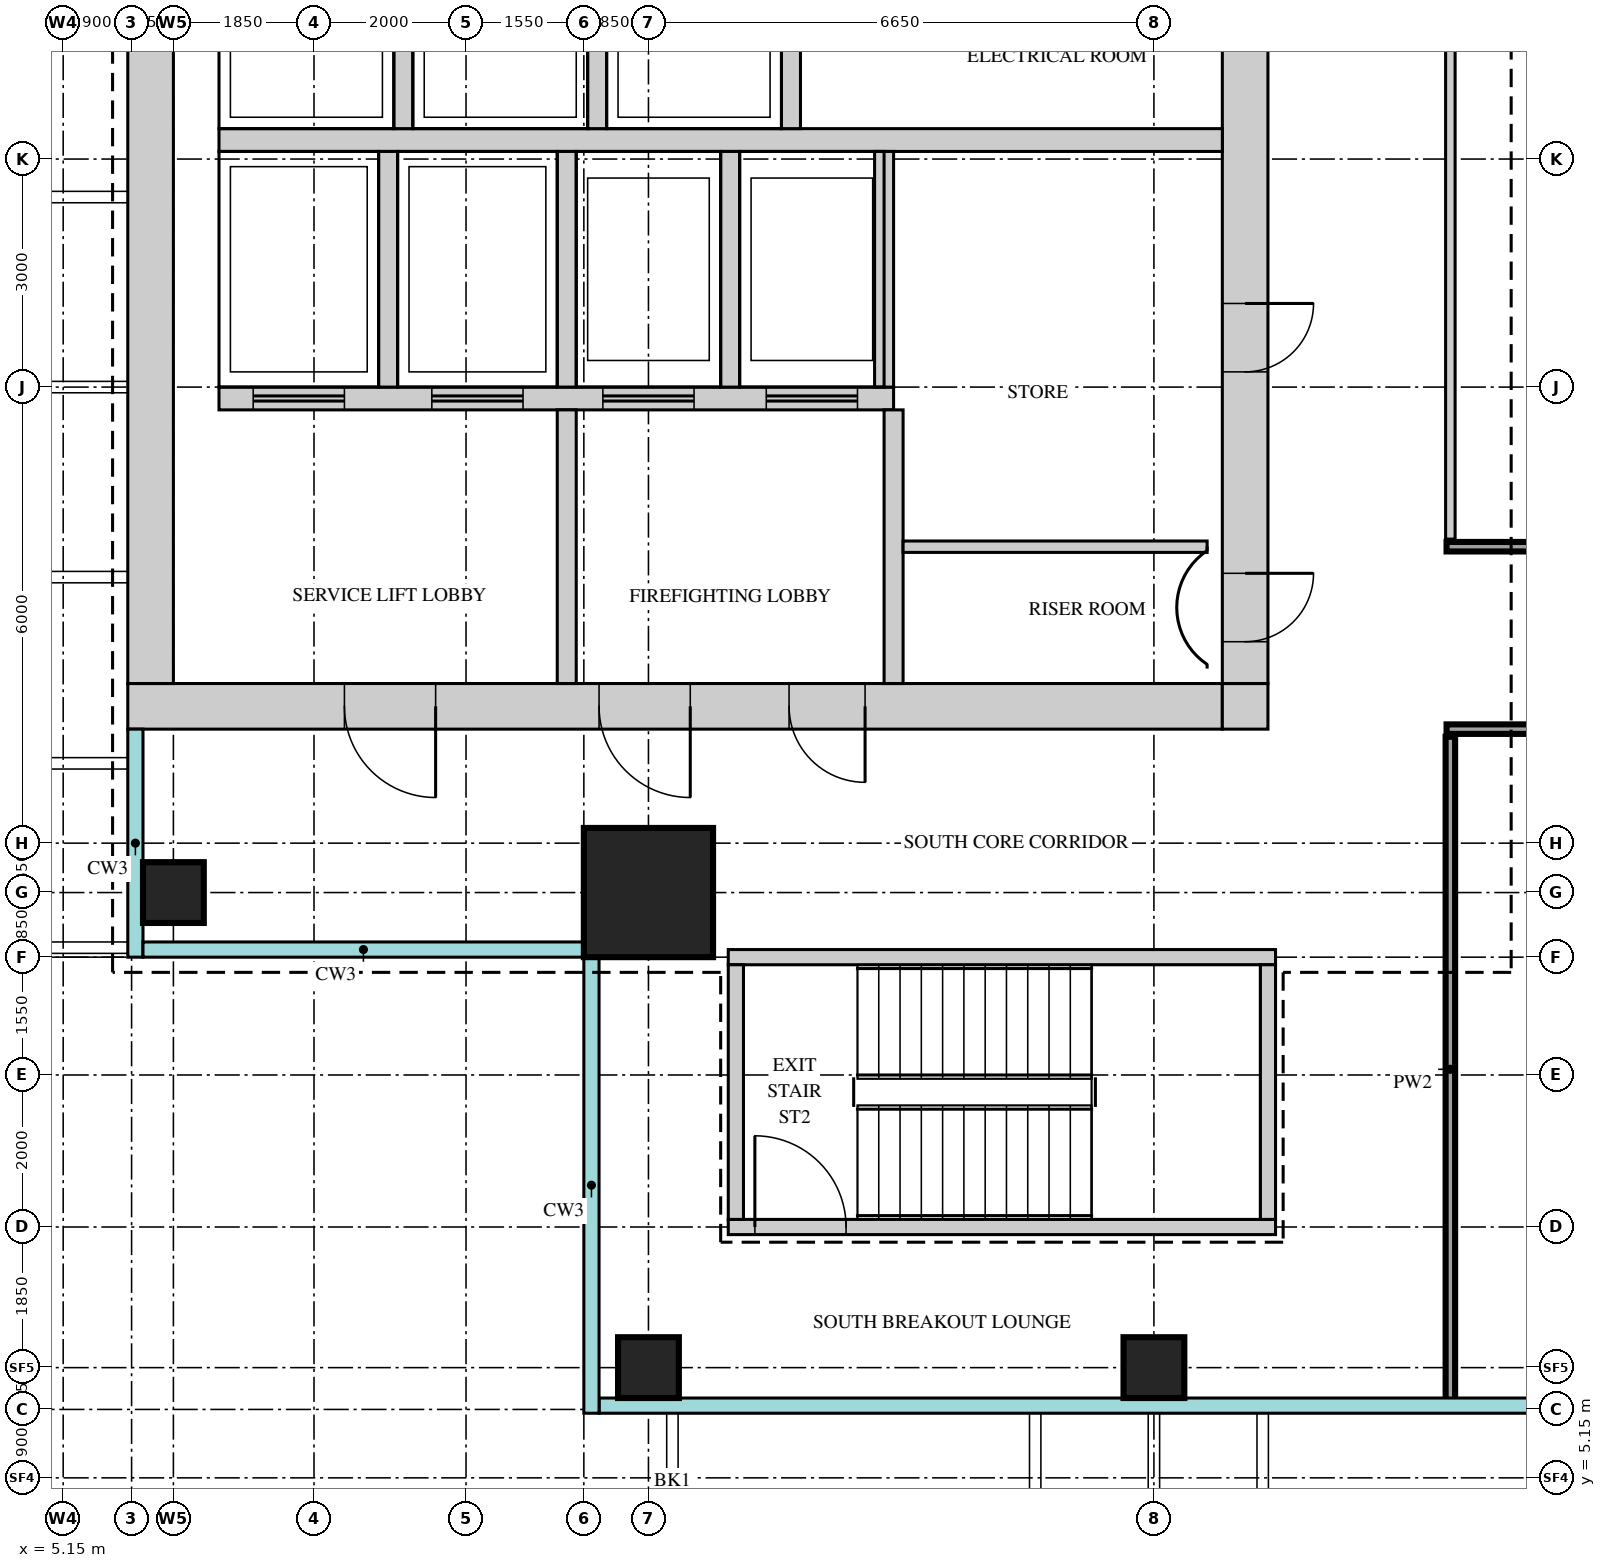
"""IFC4 building model, lengths in metres.
Left out: names, types, materials, properties, quantities, classifications, styles, units other than length and angle.
Written with IfcOpenShell. Run it as: python <this file> out.ifc"""

import sys

from ifc_helpers import new_model, si_unit, direction, frame, frame_2d, origin, origin_2d, place, context, subcontext, project, spatial, rectangle, extrude, source, transform, mapped, element, fill, save


model = new_model("IFC4")
c1 = context("Model", 3, precision=1e-05, world=origin(), true_north=direction((0.0, 1.0)))
c2 = subcontext(c1, "Body", "Model", "MODEL_VIEW")
j1 = project(units=[si_unit("LENGTHUNIT", "METRE"), si_unit("PLANEANGLEUNIT", "RADIAN")], contexts=[c1])
p1 = place(None, origin())
s1 = spatial("IfcSite", under=j1, at=p1, CompositionType="ELEMENT")
p2 = place(p1, origin())
s2 = spatial("IfcBuilding", under=s1, at=p2, CompositionType="ELEMENT")
p3 = place(p2, frame((0.0, 0.0, 318.2)))
s3 = spatial("IfcBuildingStorey", under=s2, at=p3, CompositionType="ELEMENT", Elevation=318.2)
m1 = source(origin(), c2, "Body", "SweptSolid", [
    extrude(rectangle(XDim=14.4, YDim=0.6, at=frame_2d((7.2, 0.0))), origin(), (0.0, 0.0, 1.0), 3.75),
])
p4 = place(p3, frame((6.0, 15.3, 0.0), z_axis=(0.0, 0.0, 1.0), x_axis=(1.0, 0.0, 0.0)))
e1 = element("IfcWall", 1, at=p4, inside=s3, PredefinedType="SHEAR", context=c2, shape_type="MappedRepresentation", body=[
    mapped(m1, transform((0.0, 0.0, 0.0))),
])
m2 = source(origin(), c2, "Body", "SweptSolid", [
    extrude(rectangle(XDim=1.2, YDim=2.1, at=frame_2d((0.6, 1.05))), frame((0.0, 0.31, 0.0), z_axis=(0.0, -1.0, 0.0), x_axis=(1.0, 0.0, 0.0)), (0.0, 0.0, 1.0), 0.62),
])
p5 = place(p4, frame((6.2, 0.0, 0.0)))
e2 = element("IfcOpeningElement", 2, at=p5, cuts=e1, PredefinedType="OPENING", context=c2, shape_type="MappedRepresentation", body=[
    mapped(m2, transform((0.0, 0.0, 0.0))),
])
p6 = place(p4, frame((2.85, 0.0, 0.0)))
e3 = element("IfcOpeningElement", 3, at=p6, cuts=e1, PredefinedType="OPENING", context=c2, shape_type="MappedRepresentation", body=[
    mapped(m2, transform((0.0, 0.0, 0.0))),
])
m3 = source(origin(), c2, "Body", "SweptSolid", [
    extrude(rectangle(XDim=1.0, YDim=2.1, at=frame_2d((0.5, 1.05))), frame((0.0, 0.31, 0.0), z_axis=(0.0, -1.0, 0.0), x_axis=(1.0, 0.0, 0.0)), (0.0, 0.0, 1.0), 0.62),
])
p7 = place(p4, frame((8.7, 0.0, 0.0)))
e4 = element("IfcOpeningElement", 4, at=p7, cuts=e1, PredefinedType="OPENING", context=c2, shape_type="MappedRepresentation", body=[
    mapped(m3, transform((0.0, 0.0, 0.0))),
])
m4 = source(origin(), c2, "Body", "SweptSolid", [
    extrude(rectangle(XDim=0.6, YDim=0.6, at=frame_2d((0.3, 0.0))), origin(), (0.0, 0.0, 1.0), 3.75),
])
p8 = place(p3, frame((20.4, 15.3, 0.0), z_axis=(0.0, 0.0, 1.0), x_axis=(1.0, 0.0, 0.0)))
e5 = element("IfcWall", 5, at=p8, inside=s3, PredefinedType="SHEAR", context=c2, shape_type="MappedRepresentation", body=[
    mapped(m4, transform((0.0, 0.0, 0.0))),
])
m5 = source(origin(), c2, "Body", "SweptSolid", [
    extrude(rectangle(XDim=22.8, YDim=0.6, at=frame_2d((11.4, 0.0))), origin(), (0.0, 0.0, 1.0), 3.75),
])
p9 = place(p3, frame((20.7, 15.6, 0.0), z_axis=(0.0, 0.0, 1.0), x_axis=(0.0, 1.0, 0.0)))
e6 = element("IfcWall", 6, at=p9, inside=s3, PredefinedType="SHEAR", context=c2, shape_type="MappedRepresentation", body=[
    mapped(m5, transform((0.0, 0.0, 0.0))),
])
m6 = source(origin(), c2, "Body", "SweptSolid", [
    extrude(rectangle(XDim=1.8, YDim=2.1, at=frame_2d((0.9, 1.05))), frame((0.0, 0.31, 0.0), z_axis=(0.0, -1.0, 0.0), x_axis=(1.0, 0.0, 0.0)), (0.0, 0.0, 1.0), 0.62),
])
p10 = place(p9, frame((10.9, 0.0, 0.0)))
e7 = element("IfcOpeningElement", 7, at=p10, cuts=e6, PredefinedType="OPENING", context=c2, shape_type="MappedRepresentation", body=[
    mapped(m6, transform((0.0, 0.0, 0.0))),
])
m7 = source(origin(), c2, "Body", "SweptSolid", [
    extrude(rectangle(XDim=0.9, YDim=2.1, at=frame_2d((0.45, 1.05))), frame((0.0, 0.31, 0.0), z_axis=(0.0, -1.0, 0.0), x_axis=(1.0, 0.0, 0.0)), (0.0, 0.0, 1.0), 0.62),
])
p11 = place(p9, frame((0.55, 0.0, 0.0)))
e8 = element("IfcOpeningElement", 8, at=p11, cuts=e6, PredefinedType="OPENING", context=c2, shape_type="MappedRepresentation", body=[
    mapped(m7, transform((0.0, 0.0, 0.0))),
])
p12 = place(p9, frame((4.1, 0.0, 0.0)))
e9 = element("IfcOpeningElement", 9, at=p12, cuts=e6, PredefinedType="OPENING", context=c2, shape_type="MappedRepresentation", body=[
    mapped(m7, transform((0.0, 0.0, 0.0))),
])
p13 = place(p3, frame((6.3, 15.6, 0.0), z_axis=(0.0, 0.0, 1.0), x_axis=(0.0, 1.0, 0.0)))
e10 = element("IfcWall", 10, at=p13, inside=s3, PredefinedType="SHEAR", context=c2, shape_type="MappedRepresentation", body=[
    mapped(m5, transform((0.0, 0.0, 0.0))),
])
m8 = source(origin(), c2, "Body", "SweptSolid", [
    extrude(rectangle(XDim=7.2, YDim=0.2, at=frame_2d((3.6, 0.0))), origin(), (0.0, 0.0, 1.0), 3.75),
])
p14 = place(p3, frame((13.9, 12.0, 0.0), z_axis=(0.0, 0.0, 1.0), x_axis=(1.0, 0.0, 0.0)))
e11 = element("IfcWall", 11, at=p14, inside=s3, PredefinedType="SHEAR", context=c2, shape_type="MappedRepresentation", body=[
    mapped(m8, transform((0.0, 0.0, 0.0))),
])
p15 = place(p3, frame((13.9, 8.45, 0.0), z_axis=(0.0, 0.0, 1.0), x_axis=(1.0, 0.0, 0.0)))
e12 = element("IfcWall", 12, at=p15, inside=s3, PredefinedType="SHEAR", context=c2, shape_type="MappedRepresentation", body=[
    mapped(m8, transform((0.0, 0.0, 0.0))),
])
m9 = source(origin(), c2, "Body", "SweptSolid", [
    extrude(rectangle(XDim=1.2, YDim=2.1, at=frame_2d((0.6, 1.05))), frame((0.0, 0.11, 0.0), z_axis=(0.0, -1.0, 0.0), x_axis=(1.0, 0.0, 0.0)), (0.0, 0.0, 1.0), 0.22),
])
p16 = place(p15, frame((0.35, 0.0, 0.0)))
e13 = element("IfcOpeningElement", 13, at=p16, cuts=e12, PredefinedType="OPENING", context=c2, shape_type="MappedRepresentation", body=[
    mapped(m9, transform((0.0, 0.0, 0.0))),
])
m10 = source(origin(), c2, "Body", "SweptSolid", [
    extrude(rectangle(XDim=3.35, YDim=0.2, at=frame_2d((1.675, 0.0))), origin(), (0.0, 0.0, 1.0), 3.75),
])
for number, where, z_axis, x_axis in (
    (14, (21.0, 8.55, 0.0), (0.0, 0.0, 1.0), (0.0, 1.0, 0.0)),
    (15, (14.0, 8.55, 0.0), (0.0, 0.0, 1.0), (0.0, 1.0, 0.0)),
):
    element("IfcWall", number, at=place(p3, frame(where, z_axis=z_axis, x_axis=x_axis)), inside=s3, PredefinedType="SHEAR", context=c2, shape_type="MappedRepresentation", body=[
        mapped(m10, transform((0.0, 0.0, 0.0))),
    ])
m11 = source(origin(), c2, "Body", "SweptSolid", [
    extrude(rectangle(XDim=13.2, YDim=0.3, at=frame_2d((6.6, 0.0))), origin(), (0.0, 0.0, 1.0), 3.75),
])
p17 = place(p3, frame((7.2, 22.75, 0.0), z_axis=(0.0, 0.0, 1.0), x_axis=(1.0, 0.0, 0.0)))
e16 = element("IfcWall", 16, at=p17, inside=s3, PredefinedType="STANDARD", context=c2, shape_type="MappedRepresentation", body=[
    mapped(m11, transform((0.0, 0.0, 0.0))),
])
m12 = source(origin(), c2, "Body", "SweptSolid", [
    extrude(rectangle(XDim=8.875, YDim=0.3, at=frame_2d((4.438, 0.0))), origin(), (0.0, 0.0, 1.0), 3.75),
])
p18 = place(p3, frame((7.2, 19.35, 0.0), z_axis=(0.0, 0.0, 1.0), x_axis=(1.0, 0.0, 0.0)))
e17 = element("IfcWall", 17, at=p18, inside=s3, PredefinedType="STANDARD", context=c2, shape_type="MappedRepresentation", body=[
    mapped(m12, transform((0.0, 0.0, 0.0))),
])
m13 = source(origin(), c2, "Body", "SweptSolid", [
    extrude(rectangle(XDim=1.2, YDim=2.1, at=frame_2d((0.6, 1.05))), frame((0.0, 0.16, 0.0), z_axis=(0.0, -1.0, 0.0), x_axis=(1.0, 0.0, 0.0)), (0.0, 0.0, 1.0), 0.32),
])
p19 = place(p18, frame((0.45, 0.0, 0.0)))
e18 = element("IfcOpeningElement", 18, at=p19, cuts=e17, PredefinedType="OPENING", context=c2, shape_type="MappedRepresentation", body=[
    mapped(m13, transform((0.0, 0.0, 0.0))),
])
p20 = place(p18, frame((2.8, 0.0, 0.0)))
e19 = element("IfcOpeningElement", 19, at=p20, cuts=e17, PredefinedType="OPENING", context=c2, shape_type="MappedRepresentation", body=[
    mapped(m13, transform((0.0, 0.0, 0.0))),
])
p21 = place(p18, frame((5.05, 0.0, 0.0)))
e20 = element("IfcOpeningElement", 20, at=p21, cuts=e17, PredefinedType="OPENING", context=c2, shape_type="MappedRepresentation", body=[
    mapped(m13, transform((0.0, 0.0, 0.0))),
])
p22 = place(p18, frame((7.2, 0.0, 0.0)))
e21 = element("IfcOpeningElement", 21, at=p22, cuts=e17, PredefinedType="OPENING", context=c2, shape_type="MappedRepresentation", body=[
    mapped(m13, transform((0.0, 0.0, 0.0))),
])
m14 = source(origin(), c2, "Body", "SweptSolid", [
    extrude(rectangle(XDim=3.1, YDim=0.25, at=frame_2d((1.55, 0.0))), origin(), (0.0, 0.0, 1.0), 3.75),
])
for number, where, z_axis, x_axis in (
    (22, (9.425, 19.5, 0.0), (0.0, 0.0, 1.0), (0.0, 1.0, 0.0)),
    (23, (11.775, 19.5, 0.0), (0.0, 0.0, 1.0), (0.0, 1.0, 0.0)),
    (24, (13.925, 19.5, 0.0), (0.0, 0.0, 1.0), (0.0, 1.0, 0.0)),
    (25, (15.95, 19.5, 0.0), (0.0, 0.0, 1.0), (0.0, 1.0, 0.0)),
):
    element("IfcWall", number, at=place(p3, frame(where, z_axis=z_axis, x_axis=x_axis)), inside=s3, PredefinedType="STANDARD", context=c2, shape_type="MappedRepresentation", body=[
        mapped(m14, transform((0.0, 0.0, 0.0))),
    ])
m15 = source(origin(), c2, "Body", "SweptSolid", [
    extrude(rectangle(XDim=2.4, YDim=0.25, at=frame_2d((1.2, 0.0))), origin(), (0.0, 0.0, 1.0), 3.75),
])
for number, where, z_axis, x_axis in (
    (26, (9.625, 22.9, 0.0), (0.0, 0.0, 1.0), (0.0, 1.0, 0.0)),
    (27, (12.175, 22.9, 0.0), (0.0, 0.0, 1.0), (0.0, 1.0, 0.0)),
    (28, (14.725, 22.9, 0.0), (0.0, 0.0, 1.0), (0.0, 1.0, 0.0)),
):
    element("IfcWall", number, at=place(p3, frame(where, z_axis=z_axis, x_axis=x_axis)), inside=s3, PredefinedType="STANDARD", context=c2, shape_type="MappedRepresentation", body=[
        mapped(m15, transform((0.0, 0.0, 0.0))),
    ])
m16 = source(origin(), c2, "Body", "SweptSolid", [
    extrude(rectangle(XDim=3.6, YDim=0.25, at=frame_2d((1.8, 0.0))), origin(), (0.0, 0.0, 1.0), 3.75),
])
for number, where, z_axis, x_axis in (
    (29, (16.075, 15.6, 0.0), (0.0, 0.0, 1.0), (0.0, 1.0, 0.0)),
    (30, (11.775, 15.6, 0.0), (0.0, 0.0, 1.0), (0.0, 1.0, 0.0)),
):
    element("IfcWall", number, at=place(p3, frame(where, z_axis=z_axis, x_axis=x_axis)), inside=s3, PredefinedType="STANDARD", context=c2, shape_type="MappedRepresentation", body=[
        mapped(m16, transform((0.0, 0.0, 0.0))),
    ])
m17 = source(origin(), c2, "Body", "SweptSolid", [
    extrude(rectangle(XDim=1.7, YDim=1.7, at=origin_2d()), origin(), (0.0, 0.0, 1.0), 3.75),
])
p23 = place(p3, frame((12.85, 12.85, 0.0), z_axis=(0.0, 0.0, 1.0), x_axis=(1.0, 0.0, 0.0)))
e31 = element("IfcColumn", 31, at=p23, inside=s3, PredefinedType="COLUMN", context=c2, shape_type="MappedRepresentation", body=[
    mapped(m17, transform((0.0, 0.0, 0.0))),
])
m18 = source(origin(), c2, "Body", "SweptSolid", [
    extrude(rectangle(XDim=0.8, YDim=0.8, at=origin_2d()), origin(), (0.0, 0.0, 1.0), 3.75),
])
for number, where, z_axis, x_axis in (
    (32, (12.85, 6.6, 0.0), (0.0, 0.0, 1.0), (1.0, 0.0, 0.0)),
    (33, (19.5, 6.6, 0.0), (0.0, 0.0, 1.0), (1.0, 0.0, 0.0)),
    (34, (6.6, 12.85, 0.0), (0.0, 0.0, 1.0), (1.0, 0.0, 0.0)),
):
    element("IfcColumn", number, at=place(p3, frame(where, z_axis=z_axis, x_axis=x_axis)), inside=s3, PredefinedType="COLUMN", context=c2, shape_type="MappedRepresentation", body=[
        mapped(m18, transform((0.0, 0.0, 0.0))),
    ])
m19 = source(origin(), c2, "Body", "SweptSolid", [
    extrude(rectangle(XDim=8.75, YDim=0.125, at=frame_2d((4.375, 0.0))), origin(), (0.0, 0.0, 1.0), 3.8),
])
p24 = place(p3, frame((23.4, 6.15, 0.0), z_axis=(0.0, 0.0, 1.0), x_axis=(0.0, 1.0, 0.0)))
e35 = element("IfcWall", 35, at=p24, inside=s3, PredefinedType="PARTITIONING", context=c2, shape_type="MappedRepresentation", body=[
    mapped(m19, transform((0.0, 0.0, 0.0))),
])
m20 = source(origin(), c2, "Body", "SweptSolid", [
    extrude(rectangle(XDim=19.1, YDim=0.125, at=frame_2d((9.55, 0.0))), origin(), (0.0, 0.0, 1.0), 3.8),
])
p25 = place(p3, frame((23.35, 15.0, 0.0), z_axis=(0.0, 0.0, 1.0), x_axis=(1.0, 0.0, 0.0)))
e36 = element("IfcWall", 36, at=p25, inside=s3, PredefinedType="PARTITIONING", context=c2, shape_type="MappedRepresentation", body=[
    mapped(m20, transform((0.0, 0.0, 0.0))),
])
m21 = source(origin(), c2, "Body", "SweptSolid", [
    extrude(rectangle(XDim=0.9, YDim=2.1, at=frame_2d((0.45, 1.05))), frame((0.0, 0.073, 0.0), z_axis=(0.0, -1.0, 0.0), x_axis=(1.0, 0.0, 0.0)), (0.0, 0.0, 1.0), 0.145),
])
p26 = place(p25, frame((5.3, 0.0, 0.0)))
e37 = element("IfcOpeningElement", 37, at=p26, cuts=e36, PredefinedType="OPENING", context=c2, shape_type="MappedRepresentation", body=[
    mapped(m21, transform((0.0, 0.0, 0.0))),
])
p27 = place(p25, frame((13.3, 0.0, 0.0)))
e38 = element("IfcOpeningElement", 38, at=p27, cuts=e36, PredefinedType="OPENING", context=c2, shape_type="MappedRepresentation", body=[
    mapped(m21, transform((0.0, 0.0, 0.0))),
])
m22 = source(origin(), c2, "Body", "SweptSolid", [
    extrude(rectangle(XDim=4.0, YDim=0.15, at=frame_2d((2.0, 0.0))), origin(), (0.0, 0.0, 1.0), 3.8),
])
p28 = place(p3, frame((16.2, 17.4, 0.0), z_axis=(0.0, 0.0, 1.0), x_axis=(1.0, 0.0, 0.0)))
e39 = element("IfcWall", 39, at=p28, inside=s3, PredefinedType="PARTITIONING", context=c2, shape_type="MappedRepresentation", body=[
    mapped(m22, transform((0.0, 0.0, 0.0))),
])
m23 = source(origin(), c2, "Body", "SweptSolid", [
    extrude(rectangle(XDim=16.7, YDim=0.125, at=frame_2d((8.35, 0.0))), origin(), (0.0, 0.0, 1.0), 3.8),
])
p29 = place(p3, frame((23.35, 17.4, 0.0), z_axis=(0.0, 0.0, 1.0), x_axis=(1.0, 0.0, 0.0)))
e40 = element("IfcWall", 40, at=p29, inside=s3, PredefinedType="PARTITIONING", context=c2, shape_type="MappedRepresentation", body=[
    mapped(m23, transform((0.0, 0.0, 0.0))),
])
m24 = source(origin(), c2, "Body", "SweptSolid", [
    extrude(rectangle(XDim=19.0, YDim=0.125, at=frame_2d((9.5, 0.0))), origin(), (0.0, 0.0, 1.0), 3.8),
])
p30 = place(p3, frame((23.4, 17.5, 0.0), z_axis=(0.0, 0.0, 1.0), x_axis=(0.0, 1.0, 0.0)))
e41 = element("IfcWall", 41, at=p30, inside=s3, PredefinedType="PARTITIONING", context=c2, shape_type="MappedRepresentation", body=[
    mapped(m24, transform((0.0, 0.0, 0.0))),
])
m25 = source(origin(), c2, "Body", "SweptSolid", [
    extrude(rectangle(XDim=1.2, YDim=2.1, at=frame_2d((0.6, 1.05))), frame((0.0, 0.073, 0.0), z_axis=(0.0, -1.0, 0.0), x_axis=(1.0, 0.0, 0.0)), (0.0, 0.0, 1.0), 0.145),
])
p31 = place(p30, frame((8.9, 0.0, 0.0)))
e42 = element("IfcOpeningElement", 42, at=p31, cuts=e41, PredefinedType="OPENING", context=c2, shape_type="MappedRepresentation", body=[
    mapped(m25, transform((0.0, 0.0, 0.0))),
])
p32 = place(p30, frame((17.95, 0.0, 0.0)))
e43 = element("IfcOpeningElement", 43, at=p32, cuts=e41, PredefinedType="OPENING", context=c2, shape_type="MappedRepresentation", body=[
    mapped(m21, transform((0.0, 0.0, 0.0))),
])
m26 = source(origin(), c2, "Body", "SweptSolid", [
    extrude(rectangle(XDim=0.9, YDim=2.1, at=frame_2d((0.45, 1.05))), frame((0.0, 0.25, 0.0), z_axis=(0.0, -1.0, 0.0), x_axis=(1.0, 0.0, 0.0)), (0.0, 0.0, 1.0), 0.5),
])
p33 = place(p11, origin())
e44 = element("IfcDoor", 44, at=p33, inside=s3, OperationType="SINGLE_SWING_RIGHT", PredefinedType="DOOR", context=c2, shape_type="MappedRepresentation", body=[
    mapped(m26, transform((0.0, 0.0, 0.0))),
])
fill(e8, e44)
p34 = place(p12, origin())
e45 = element("IfcDoor", 45, at=p34, inside=s3, OperationType="SINGLE_SWING_RIGHT", PredefinedType="DOOR", context=c2, shape_type="MappedRepresentation", body=[
    mapped(m26, transform((0.0, 0.0, 0.0))),
])
fill(e9, e45)
m27 = source(origin(), c2, "Body", "SweptSolid", [
    extrude(rectangle(XDim=1.2, YDim=2.1, at=frame_2d((0.6, 1.05))), frame((0.0, 0.25, 0.0), z_axis=(0.0, -1.0, 0.0), x_axis=(1.0, 0.0, 0.0)), (0.0, 0.0, 1.0), 0.5),
])
p35 = place(p5, origin())
e46 = element("IfcDoor", 46, at=p35, inside=s3, OperationType="SINGLE_SWING_RIGHT", PredefinedType="DOOR", context=c2, shape_type="MappedRepresentation", body=[
    mapped(m27, transform((0.0, 0.0, 0.0))),
])
fill(e2, e46)
p36 = place(p6, origin())
e47 = element("IfcDoor", 47, at=p36, inside=s3, OperationType="SINGLE_SWING_RIGHT", PredefinedType="DOOR", context=c2, shape_type="MappedRepresentation", body=[
    mapped(m27, transform((0.0, 0.0, 0.0))),
])
fill(e3, e47)
m28 = source(origin(), c2, "Body", "SweptSolid", [
    extrude(rectangle(XDim=1.0, YDim=2.1, at=frame_2d((0.5, 1.05))), frame((0.0, 0.25, 0.0), z_axis=(0.0, -1.0, 0.0), x_axis=(1.0, 0.0, 0.0)), (0.0, 0.0, 1.0), 0.5),
])
p37 = place(p7, origin())
e48 = element("IfcDoor", 48, at=p37, inside=s3, OperationType="SINGLE_SWING_RIGHT", PredefinedType="DOOR", context=c2, shape_type="MappedRepresentation", body=[
    mapped(m28, transform((0.0, 0.0, 0.0))),
])
fill(e4, e48)
m29 = source(origin(), c2, "Body", "SweptSolid", [
    extrude(rectangle(XDim=1.2, YDim=2.1, at=frame_2d((0.6, 1.05))), frame((0.0, 0.025, 0.0), z_axis=(0.0, -1.0, 0.0), x_axis=(1.0, 0.0, 0.0)), (0.0, 0.0, 1.0), 0.05),
])
p38 = place(p16, origin())
e49 = element("IfcDoor", 49, at=p38, inside=s3, OperationType="SINGLE_SWING_RIGHT", PredefinedType="DOOR", context=c2, shape_type="MappedRepresentation", body=[
    mapped(m29, transform((0.0, 0.0, 0.0))),
])
fill(e13, e49)
p39 = place(p19, origin())
e50 = element("IfcDoor", 50, at=p39, inside=s3, OperationType="DOUBLE_DOOR_SLIDING", PredefinedType="DOOR", context=c2, shape_type="MappedRepresentation", body=[
    mapped(m29, transform((0.0, 0.0, 0.0))),
])
fill(e18, e50)
p40 = place(p20, origin())
e51 = element("IfcDoor", 51, at=p40, inside=s3, OperationType="DOUBLE_DOOR_SLIDING", PredefinedType="DOOR", context=c2, shape_type="MappedRepresentation", body=[
    mapped(m29, transform((0.0, 0.0, 0.0))),
])
fill(e19, e51)
p41 = place(p21, origin())
e52 = element("IfcDoor", 52, at=p41, inside=s3, OperationType="DOUBLE_DOOR_SLIDING", PredefinedType="DOOR", context=c2, shape_type="MappedRepresentation", body=[
    mapped(m29, transform((0.0, 0.0, 0.0))),
])
fill(e20, e52)
p42 = place(p22, origin())
e53 = element("IfcDoor", 53, at=p42, inside=s3, OperationType="DOUBLE_DOOR_SLIDING", PredefinedType="DOOR", context=c2, shape_type="MappedRepresentation", body=[
    mapped(m29, transform((0.0, 0.0, 0.0))),
])
fill(e21, e53)
save(model, sys.argv[1])
